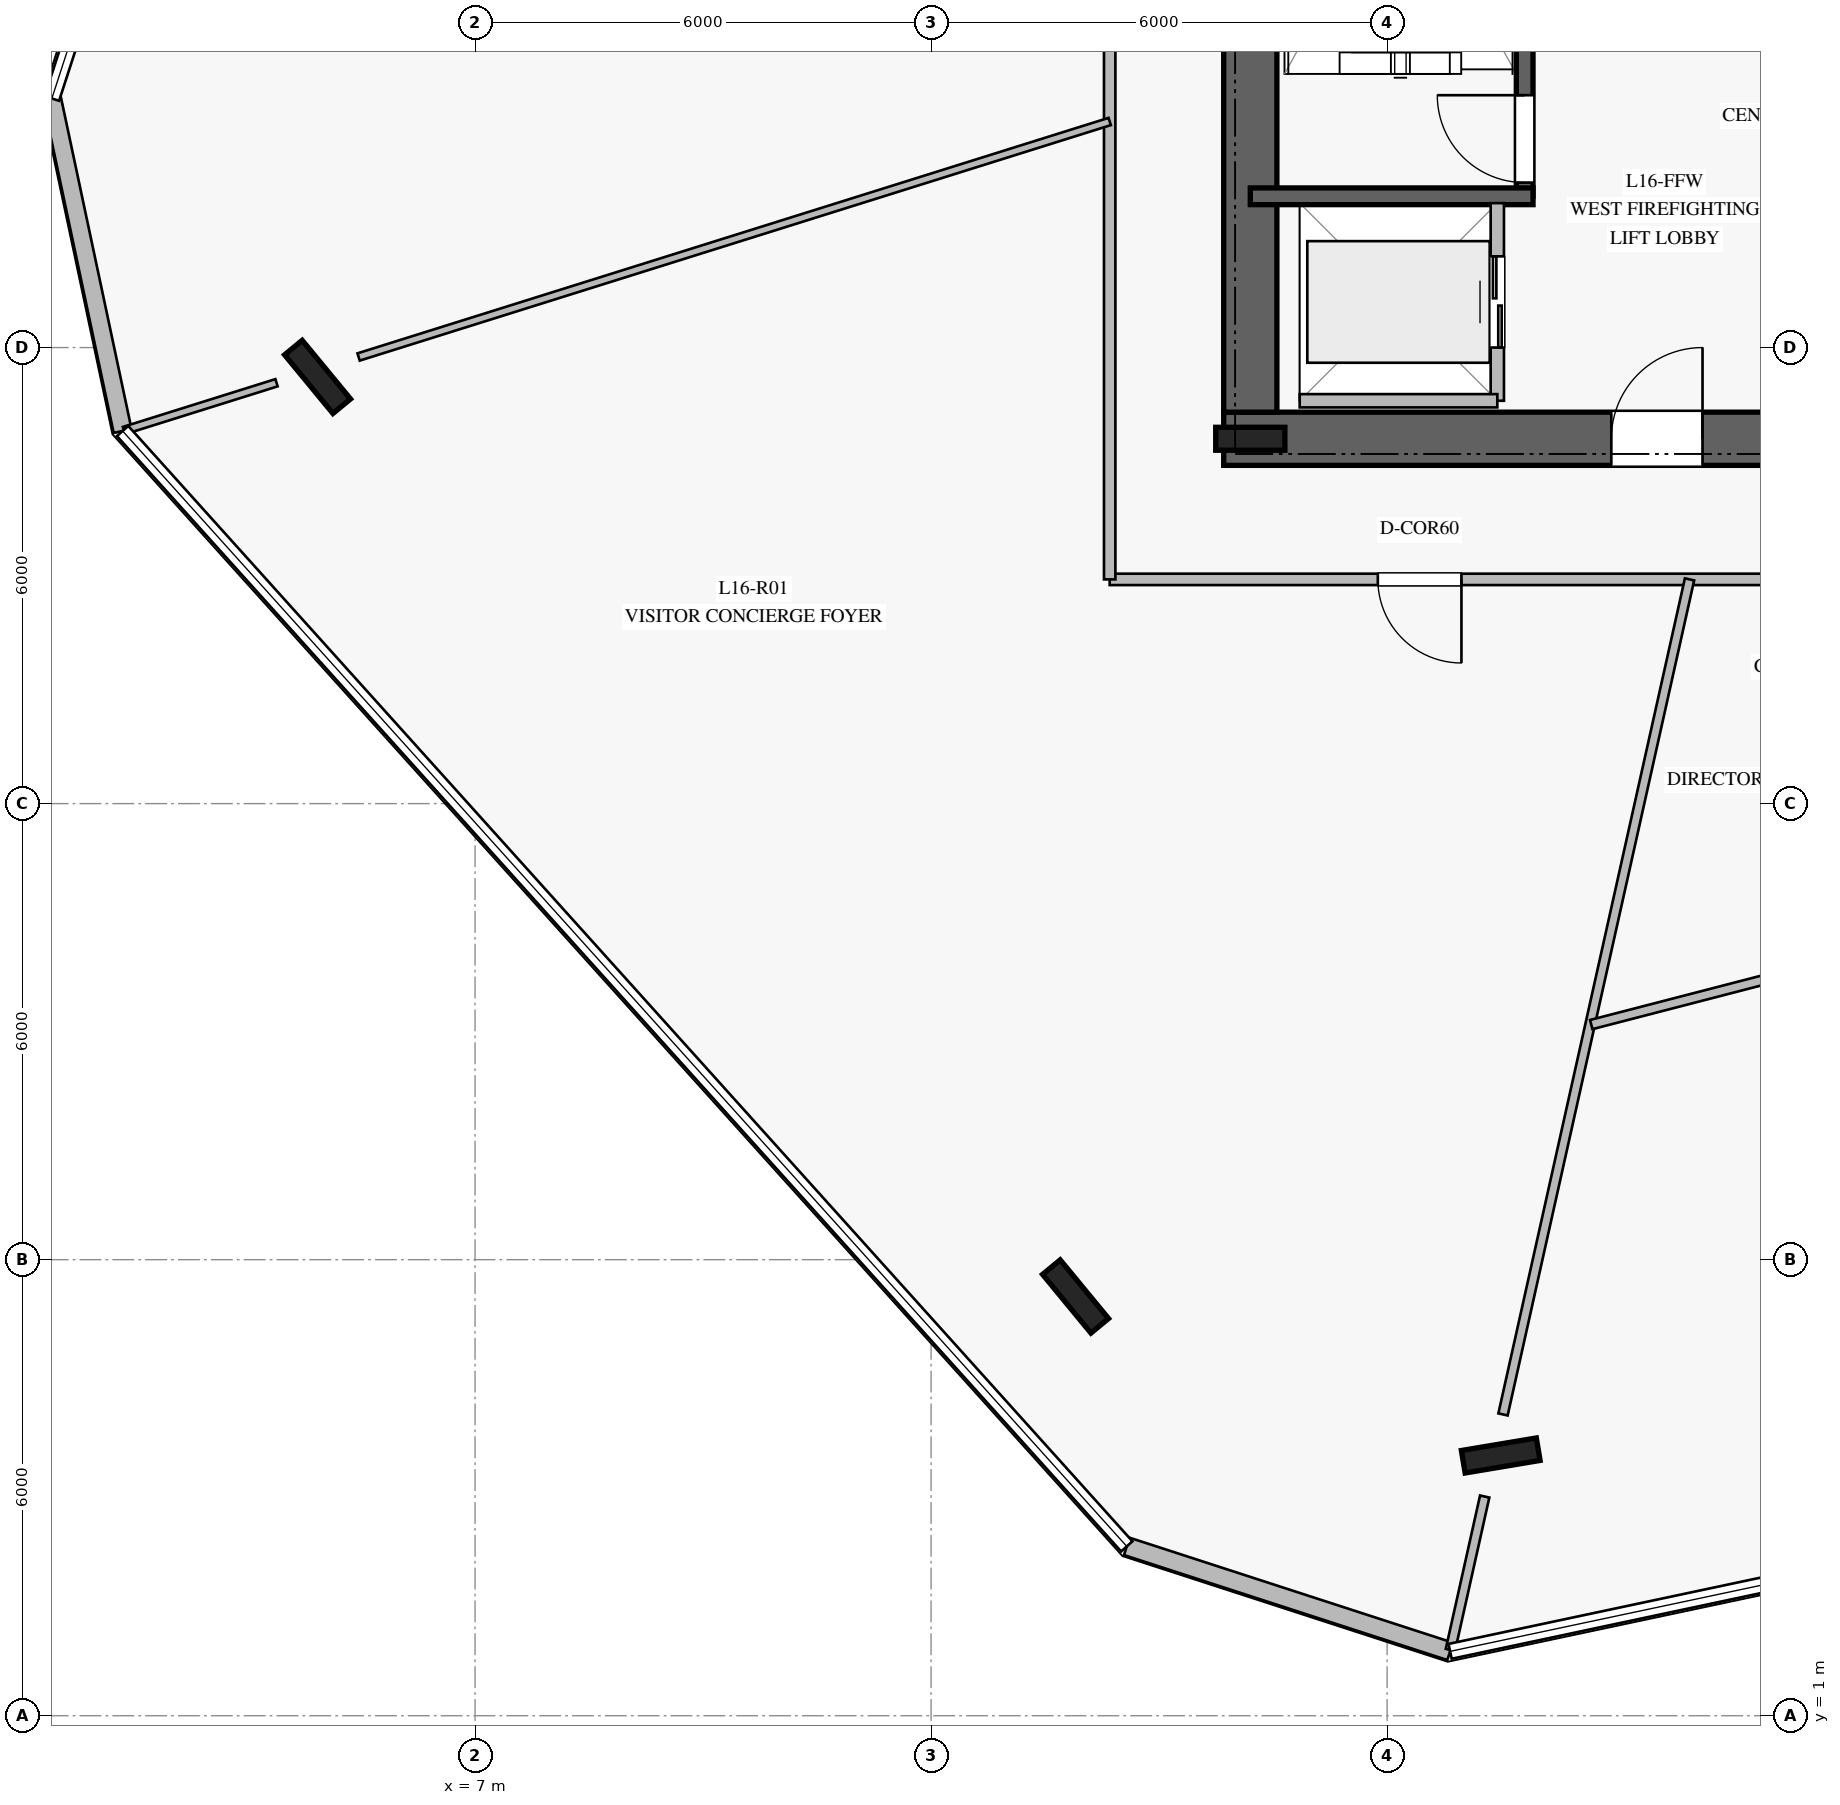
"""IFC4 building model, lengths in metres.
Left out: names, types, materials, properties, quantities, classifications, styles, units other than length and angle.
Written with IfcOpenShell. Run it as: python <this file> out.ifc"""

import sys

from ifc_helpers import new_model, si_unit, direction, frame, frame_2d, origin, origin_2d, place, context, subcontext, project, spatial, rectangle, i_section, extrude, element, fill, save


model = new_model("IFC4")
c1 = context("Model", 3, precision=1e-05, world=origin(), true_north=direction((0.0, 1.0)))
c2 = subcontext(c1, "Body", "Model", "MODEL_VIEW")
j1 = project(units=[si_unit("LENGTHUNIT", "METRE"), si_unit("PLANEANGLEUNIT", "RADIAN")], contexts=[c1])
p1 = place(None, origin())
s1 = spatial("IfcSite", under=j1, at=p1, CompositionType="ELEMENT")
p2 = place(p1, origin())
s2 = spatial("IfcBuilding", under=s1, at=p2, CompositionType="ELEMENT")
p3 = place(p2, frame((0.0, 0.0, 68.0)))
s3 = spatial("IfcBuildingStorey", under=s2, at=p3, CompositionType="ELEMENT", Elevation=68.0)
p4 = place(p3, frame((16.85, 17.8, 0.0), z_axis=(0.0, 0.0, 1.0), x_axis=(1.0, 0.0, 0.0)))
e1 = element("IfcWall", 1, at=p4, inside=s3, PredefinedType="SHEAR", context=c2, shape_type="SweptSolid", body=[
    extrude(rectangle(XDim=16.3, YDim=0.7, at=frame_2d((8.15, 0.0))), origin(), (0.0, 0.0, 1.0), 3.76),
])
p5 = place(p4, frame((5.1, 0.0, 0.0)))
e2 = element("IfcOpeningElement", 2, at=p5, cuts=e1, PredefinedType="OPENING", context=c2, shape_type="SweptSolid", body=[
    extrude(rectangle(XDim=1.2, YDim=2.25, at=frame_2d((0.6, 1.125))), frame((0.0, 0.36, 0.0), z_axis=(0.0, -1.0, 0.0), x_axis=(1.0, 0.0, 0.0)), (0.0, 0.0, 1.0), 0.72),
])
p6 = place(p4, frame((14.05, 0.0, 0.0)))
e3 = element("IfcOpeningElement", 3, at=p6, cuts=e1, PredefinedType="OPENING", context=c2, shape_type="SweptSolid", body=[
    extrude(rectangle(XDim=0.9, YDim=2.1, at=frame_2d((0.45, 1.05))), frame((0.0, 0.36, 0.0), z_axis=(0.0, -1.0, 0.0), x_axis=(1.0, 0.0, 0.0)), (0.0, 0.0, 1.0), 0.72),
])
p7 = place(p4, frame((7.95, 0.0, 0.0)))
e4 = element("IfcOpeningElement", 4, at=p7, cuts=e1, PredefinedType="OPENING", context=c2, shape_type="SweptSolid", body=[
    extrude(rectangle(XDim=1.1, YDim=2.2, at=frame_2d((0.55, 1.1))), frame((0.0, 0.36, 0.0), z_axis=(0.0, -1.0, 0.0), x_axis=(1.0, 0.0, 0.0)), (0.0, 0.0, 1.0), 0.72),
])
p8 = place(p4, frame((9.925, 0.0, 0.0)))
e5 = element("IfcOpeningElement", 5, at=p8, cuts=e1, PredefinedType="OPENING", context=c2, shape_type="SweptSolid", body=[
    extrude(rectangle(XDim=1.1, YDim=2.2, at=frame_2d((0.55, 1.1))), frame((0.0, 0.36, 0.0), z_axis=(0.0, -1.0, 0.0), x_axis=(1.0, 0.0, 0.0)), (0.0, 0.0, 1.0), 0.72),
])
p9 = place(p4, frame((11.9, 0.0, 0.0)))
e6 = element("IfcOpeningElement", 6, at=p9, cuts=e1, PredefinedType="OPENING", context=c2, shape_type="SweptSolid", body=[
    extrude(rectangle(XDim=1.1, YDim=2.2, at=frame_2d((0.55, 1.1))), frame((0.0, 0.36, 0.0), z_axis=(0.0, -1.0, 0.0), x_axis=(1.0, 0.0, 0.0)), (0.0, 0.0, 1.0), 0.72),
])
p10 = place(p3, frame((17.2, 31.85, 0.0), z_axis=(0.0, 0.0, 1.0), x_axis=(0.0, -1.0, 0.0)))
e7 = element("IfcWall", 7, at=p10, inside=s3, PredefinedType="SHEAR", context=c2, shape_type="SweptSolid", body=[
    extrude(rectangle(XDim=13.7, YDim=0.7, at=frame_2d((6.85, 0.0))), origin(), (0.0, 0.0, 1.0), 3.76),
])
p11 = place(p10, frame((2.0, 0.0, 0.0)))
e8 = element("IfcOpeningElement", 8, at=p11, cuts=e7, PredefinedType="OPENING", context=c2, shape_type="SweptSolid", body=[
    extrude(rectangle(XDim=1.5, YDim=2.2, at=frame_2d((0.75, 1.1))), frame((0.0, 0.36, 0.0), z_axis=(0.0, -1.0, 0.0), x_axis=(1.0, 0.0, 0.0)), (0.0, 0.0, 1.0), 0.72),
])
p12 = place(p3, frame((17.2, 17.8, 0.0), z_axis=(0.0, 0.0, 1.0), x_axis=(1.0, 0.0, 0.0)))
e9 = element("IfcColumn", 9, at=p12, inside=s3, PredefinedType="COLUMN", context=c2, shape_type="SweptSolid", body=[
    extrude(i_section(OverallWidth=0.302, OverallDepth=0.91, WebThickness=0.021, FlangeThickness=0.04, at=origin_2d()), origin(), (0.0, 0.0, 1.0), 4.0),
])
p13 = place(p3, frame((20.81, 20.99, 0.0), z_axis=(0.0, 0.0, 1.0), x_axis=(0.0, 1.0, 0.0)))
e10 = element("IfcWall", 10, at=p13, inside=s3, PredefinedType="SOLIDWALL", context=c2, shape_type="SweptSolid", body=[
    extrude(rectangle(XDim=7.22, YDim=0.22, at=frame_2d((3.61, 0.0))), origin(), (0.0, 0.0, 1.0), 3.76),
])
p14 = place(p13, frame((0.18, 0.0, 0.0)))
e11 = element("IfcOpeningElement", 11, at=p14, cuts=e10, PredefinedType="OPENING", context=c2, shape_type="SweptSolid", body=[
    extrude(rectangle(XDim=1.15, YDim=2.2, at=frame_2d((0.575, 1.1))), frame((0.0, 0.12, 0.0), z_axis=(0.0, -1.0, 0.0), x_axis=(1.0, 0.0, 0.0)), (0.0, 0.0, 1.0), 0.24),
])
p15 = place(p3, frame((17.2, 20.99, 0.0), z_axis=(0.0, 0.0, 1.0), x_axis=(1.0, 0.0, 0.0)))
e12 = element("IfcWall", 12, at=p15, inside=s3, PredefinedType="SOLIDWALL", context=c2, shape_type="SweptSolid", body=[
    extrude(rectangle(XDim=3.72, YDim=0.22, at=frame_2d((1.86, 0.0))), origin(), (0.0, 0.0, 1.0), 3.76),
])
for number, where, z_axis, x_axis in (
    (13, (4.928, 18.614, 0.0), (0.0, 0.0, 1.0), (-0.636, 0.772, 0.0)),
    (14, (14.901, 6.516, 0.0), (0.0, 0.0, 1.0), (-0.636, 0.772, 0.0)),
    (15, (20.495, 4.424, 0.0), (0.0, 0.0, 1.0), (0.986, 0.165, 0.0)),
):
    element("IfcColumn", number, at=place(p3, frame(where, z_axis=z_axis, x_axis=x_axis)), inside=s3, PredefinedType="COLUMN", context=c2, shape_type="SweptSolid", body=[
        extrude(i_section(OverallWidth=0.3, OverallDepth=1.0, WebThickness=0.019, FlangeThickness=0.036, at=origin_2d()), origin(), (0.0, 0.0, 1.0), 4.0),
    ])
p16 = place(p3, frame((1.432, 22.277, 0.0), z_axis=(0.0, 0.0, 1.0), x_axis=(0.20817208226, -0.978092216597, 0.0)))
e16 = element("IfcWall", 16, at=p16, inside=s3, PredefinedType="STANDARD", context=c2, shape_type="SweptSolid", body=[
    extrude(rectangle(XDim=4.473, YDim=0.24, at=frame_2d((2.236, 0.0))), origin(), (0.0, 0.0, 1.0), 3.76),
])
p17 = place(p3, frame((15.575, 3.228, 0.0), z_axis=(0.0, 0.0, 1.0), x_axis=(0.951132297172, -0.308783667438, 0.0)))
e17 = element("IfcWall", 17, at=p17, inside=s3, PredefinedType="STANDARD", context=c2, shape_type="SweptSolid", body=[
    extrude(rectangle(XDim=4.473, YDim=0.24, at=frame_2d((2.236, 0.0))), origin(), (0.0, 0.0, 1.0), 3.76),
])
p18 = place(p3, frame((20.45, 18.3, 0.0), z_axis=(0.0, 0.0, 1.0), x_axis=(0.0, 1.0, 0.0)))
e18 = element("IfcWall", 18, at=p18, inside=s3, PredefinedType="PARTITIONING", context=c2, shape_type="SweptSolid", body=[
    extrude(rectangle(XDim=2.6, YDim=0.175, at=frame_2d((1.3, 0.0))), origin(), (0.0, 0.0, 1.0), 3.76),
])
p19 = place(p18, frame((0.7, 0.0, 0.0)))
e19 = element("IfcOpeningElement", 19, at=p19, cuts=e18, PredefinedType="OPENING", context=c2, shape_type="SweptSolid", body=[
    extrude(rectangle(XDim=1.2, YDim=2.2, at=frame_2d((0.6, 1.1))), frame((0.0, 0.098, 0.0), z_axis=(0.0, -1.0, 0.0), x_axis=(1.0, 0.0, 0.0)), (0.0, 0.0, 1.0), 0.195),
])
p20 = place(p3, frame((17.85, 18.3, 0.0), z_axis=(0.0, 0.0, 1.0), x_axis=(1.0, 0.0, 0.0)))
e20 = element("IfcWall", 20, at=p20, inside=s3, PredefinedType="PARTITIONING", context=c2, shape_type="SweptSolid", body=[
    extrude(rectangle(XDim=2.6, YDim=0.175, at=frame_2d((1.3, 0.0))), origin(), (0.0, 0.0, 1.0), 3.76),
])
p21 = place(p3, frame((34.65, 15.95, 0.0), z_axis=(0.0, 0.0, 1.0), x_axis=(-1.0, 0.0, 0.0)))
e21 = element("IfcWall", 21, at=p21, inside=s3, PredefinedType="PARTITIONING", context=c2, shape_type="SweptSolid", body=[
    extrude(rectangle(XDim=19.3, YDim=0.15, at=frame_2d((9.65, 0.0))), origin(), (0.0, 0.0, 1.0), 3.21),
])
p22 = place(p21, frame((14.672, 0.0, 0.0)))
e22 = element("IfcOpeningElement", 22, at=p22, cuts=e21, PredefinedType="OPENING", context=c2, shape_type="SweptSolid", body=[
    extrude(rectangle(XDim=1.1, YDim=2.2, at=frame_2d((0.55, 1.1))), frame((0.0, 0.085, 0.0), z_axis=(0.0, -1.0, 0.0), x_axis=(1.0, 0.0, 0.0)), (0.0, 0.0, 1.0), 0.17),
])
p23 = place(p21, frame((6.728, 0.0, 0.0)))
e23 = element("IfcOpeningElement", 23, at=p23, cuts=e21, PredefinedType="OPENING", context=c2, shape_type="SweptSolid", body=[
    extrude(rectangle(XDim=1.1, YDim=2.2, at=frame_2d((0.55, 1.1))), frame((0.0, 0.085, 0.0), z_axis=(0.0, -1.0, 0.0), x_axis=(1.0, 0.0, 0.0)), (0.0, 0.0, 1.0), 0.17),
])
p24 = place(p3, frame((15.35, 15.95, 0.0), z_axis=(0.0, 0.0, 1.0), x_axis=(0.0, 1.0, 0.0)))
e24 = element("IfcWall", 24, at=p24, inside=s3, PredefinedType="PARTITIONING", context=c2, shape_type="SweptSolid", body=[
    extrude(rectangle(XDim=18.1, YDim=0.15, at=frame_2d((9.05, 0.0))), origin(), (0.0, 0.0, 1.0), 3.21),
])
p25 = place(p24, frame((9.886, 0.0, 0.0)))
e25 = element("IfcOpeningElement", 25, at=p25, cuts=e24, PredefinedType="OPENING", context=c2, shape_type="SweptSolid", body=[
    extrude(rectangle(XDim=1.1, YDim=2.2, at=frame_2d((0.55, 1.1))), frame((0.0, 0.085, 0.0), z_axis=(0.0, -1.0, 0.0), x_axis=(1.0, 0.0, 0.0)), (0.0, 0.0, 1.0), 0.17),
])
p26 = place(p3, frame((15.35, 21.974, 0.0), z_axis=(0.0, 0.0, 1.0), x_axis=(-0.954204822742, -0.299154067757, 0.0)))
e26 = element("IfcWall", 26, at=p26, inside=s3, PredefinedType="MOVABLE", context=c2, shape_type="SweptSolid", body=[
    extrude(rectangle(XDim=10.356, YDim=0.1, at=frame_2d((5.178, 0.0))), origin(), (0.0, 0.0, 1.0), 3.21),
])
p27 = place(p3, frame((4.388, 18.537, 0.0), z_axis=(0.0, 0.0, 1.0), x_axis=(-0.954206927471, -0.299147354269, 0.0)))
e27 = element("IfcWall", 27, at=p27, inside=s3, PredefinedType="MOVABLE", context=c2, shape_type="SweptSolid", body=[
    extrude(rectangle(XDim=2.103, YDim=0.1, at=frame_2d((1.052, 0.0))), origin(), (0.0, 0.0, 1.0), 3.76),
])
p28 = place(p3, frame((22.979, 15.95, 0.0), z_axis=(0.0, 0.0, 1.0), x_axis=(-0.218014245953, -0.975945586886, 0.0)))
e28 = element("IfcWall", 28, at=p28, inside=s3, PredefinedType="PARTITIONING", context=c2, shape_type="SweptSolid", body=[
    extrude(rectangle(XDim=11.257, YDim=0.125, at=frame_2d((5.628, 0.0))), origin(), (0.0, 0.0, 1.0), 3.21),
])
p29 = place(p3, frame((20.284, 3.884, 0.0), z_axis=(0.0, 0.0, 1.0), x_axis=(-0.218067911201, -0.97593359718, 0.0)))
e29 = element("IfcWall", 29, at=p29, inside=s3, PredefinedType="PARTITIONING", context=c2, shape_type="SweptSolid", body=[
    extrude(rectangle(XDim=2.068, YDim=0.125, at=frame_2d((1.034, 0.0))), origin(), (0.0, 0.0, 1.0), 3.76),
])
p30 = place(p3, frame((21.686, 10.093, 0.0), z_axis=(0.0, 0.0, 1.0), x_axis=(0.968058125552, 0.250725877309, 0.0)))
e30 = element("IfcWall", 30, at=p30, inside=s3, PredefinedType="PARTITIONING", context=c2, shape_type="SweptSolid", body=[
    extrude(rectangle(XDim=12.443, YDim=0.125, at=frame_2d((6.222, 0.0))), origin(), (0.0, 0.0, 1.0), 3.76),
])
p31 = place(p30, frame((5.722, 0.0, 0.0)))
e31 = element("IfcOpeningElement", 31, at=p31, cuts=e30, PredefinedType="OPENING", context=c2, shape_type="SweptSolid", body=[
    extrude(rectangle(XDim=1.0, YDim=2.15, at=frame_2d((0.5, 1.075))), frame((0.0, 0.073, 0.0), z_axis=(0.0, -1.0, 0.0), x_axis=(1.0, 0.0, 0.0)), (0.0, 0.0, 1.0), 0.145),
])
p32 = place(p14, origin())
e32 = element("IfcDoor", 32, at=p32, inside=s3, OperationType="SINGLE_SWING_RIGHT", PredefinedType="DOOR", context=c2, shape_type="SweptSolid", body=[
    extrude(rectangle(XDim=1.15, YDim=2.2, at=frame_2d((0.575, 1.1))), frame((0.0, 0.025, 0.0), z_axis=(0.0, -1.0, 0.0), x_axis=(1.0, 0.0, 0.0)), (0.0, 0.0, 1.0), 0.05),
])
fill(e11, e32)
p33 = place(p5, origin())
e33 = element("IfcDoor", 33, at=p33, inside=s3, OperationType="SINGLE_SWING_RIGHT", PredefinedType="DOOR", context=c2, shape_type="SweptSolid", body=[
    extrude(rectangle(XDim=1.2, YDim=2.25, at=frame_2d((0.6, 1.125))), frame((0.0, 0.025, 0.0), z_axis=(0.0, -1.0, 0.0), x_axis=(1.0, 0.0, 0.0)), (0.0, 0.0, 1.0), 0.05),
])
fill(e2, e33)
p34 = place(p19, origin())
e34 = element("IfcDoor", 34, at=p34, inside=s3, OperationType="DOUBLE_DOOR_SLIDING", PredefinedType="DOOR", context=c2, shape_type="SweptSolid", body=[
    extrude(rectangle(XDim=1.2, YDim=2.2, at=frame_2d((0.6, 1.1))), frame((0.0, 0.025, 0.0), z_axis=(0.0, -1.0, 0.0), x_axis=(1.0, 0.0, 0.0)), (0.0, 0.0, 1.0), 0.05),
])
fill(e19, e34)
p35 = place(p22, origin())
e35 = element("IfcDoor", 35, at=p35, inside=s3, OperationType="SINGLE_SWING_LEFT", PredefinedType="DOOR", context=c2, shape_type="SweptSolid", body=[
    extrude(rectangle(XDim=1.1, YDim=2.2, at=frame_2d((0.55, 1.1))), frame((0.0, 0.025, 0.0), z_axis=(0.0, -1.0, 0.0), x_axis=(1.0, 0.0, 0.0)), (0.0, 0.0, 1.0), 0.05),
])
fill(e22, e35)
save(model, sys.argv[1])
